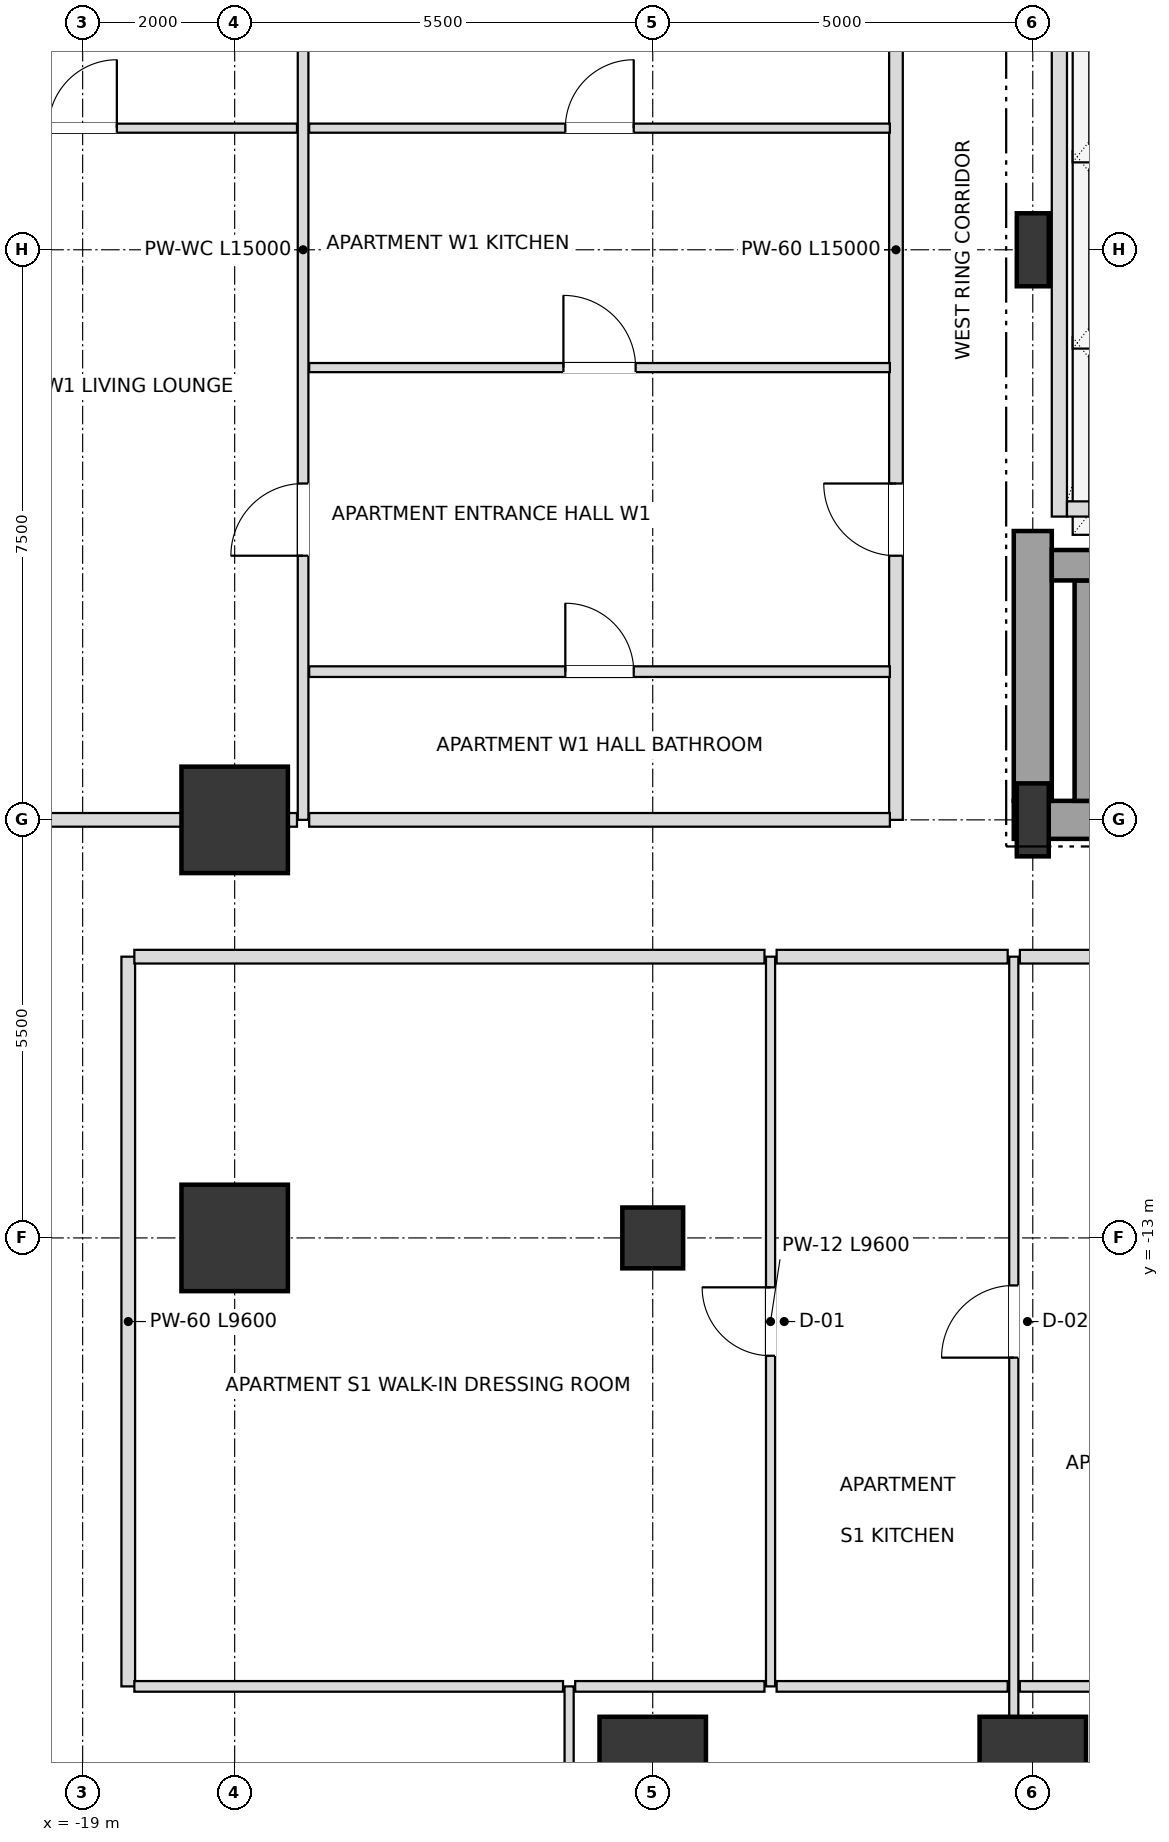
"""IFC4 building model, lengths in metres.
Left out: names, types, materials, properties, quantities, classifications, styles, units other than length and angle.
Written with IfcOpenShell. Run it as: python <this file> out.ifc"""

import sys

from ifc_helpers import new_model, si_unit, direction, frame, frame_2d, origin, origin_2d, place, context, subcontext, project, spatial, rectangle, i_section, extrude, element, fill, save


model = new_model("IFC4")
c1 = context("Model", 3, precision=1e-05, world=origin(), true_north=direction((0.0, 1.0)))
c2 = subcontext(c1, "Body", "Model", "MODEL_VIEW")
j1 = project(units=[si_unit("LENGTHUNIT", "METRE"), si_unit("PLANEANGLEUNIT", "RADIAN")], contexts=[c1])
p1 = place(None, origin())
s1 = spatial("IfcSite", under=j1, at=p1, CompositionType="ELEMENT")
p2 = place(p1, origin())
s2 = spatial("IfcBuilding", under=s1, at=p2, CompositionType="ELEMENT")
p3 = place(p2, frame((0.0, 0.0, 68.4)))
s3 = spatial("IfcBuildingStorey", under=s2, at=p3, CompositionType="ELEMENT", Elevation=68.4)
for number, where, z_axis, x_axis in (
    (1, (-6.5, -7.5, 0.0), (0.0, 0.0, 1.0), (1.0, 0.0, 0.0)),
    (2, (-6.5, 0.0, 0.0), (0.0, 0.0, 1.0), (1.0, 0.0, 0.0)),
):
    element("IfcColumn", number, at=place(p3, frame(where, z_axis=z_axis, x_axis=x_axis)), inside=s3, PredefinedType="COLUMN", context=c2, shape_type="SweptSolid", body=[
        extrude(i_section(OverallWidth=0.42, OverallDepth=0.96, WebThickness=0.022, FlangeThickness=0.034, at=origin_2d()), origin(), (0.0, 0.0, 1.0), 3.6),
    ])
for number, where, z_axis, x_axis in (
    (3, (-11.5, -20.0, 0.0), (0.0, 0.0, 1.0), (1.0, 0.0, 0.0)),
    (4, (-6.5, -20.0, 0.0), (0.0, 0.0, 1.0), (1.0, 0.0, 0.0)),
    (5, (-17.0, -7.5, 0.0), (0.0, 0.0, 1.0), (1.0, 0.0, 0.0)),
    (6, (-17.0, -13.0, 0.0), (0.0, 0.0, 1.0), (1.0, 0.0, 0.0)),
):
    element("IfcColumn", number, at=place(p3, frame(where, z_axis=z_axis, x_axis=x_axis)), inside=s3, PredefinedType="USERDEFINED", context=c2, shape_type="SweptSolid", body=[
        extrude(rectangle(XDim=1.4, YDim=1.4, at=origin_2d()), origin(), (0.0, 0.0, 1.0), 3.6),
    ])
p4 = place(p3, frame((-11.5, -13.0, 0.0), z_axis=(0.0, 0.0, 1.0), x_axis=(1.0, 0.0, 0.0)))
e7 = element("IfcColumn", 7, at=p4, inside=s3, PredefinedType="COLUMN", context=c2, shape_type="SweptSolid", body=[
    extrude(rectangle(XDim=0.8, YDim=0.8, at=origin_2d()), origin(), (0.0, 0.0, 1.0), 3.6),
])
p5 = place(p3, frame((-6.75, -7.5, 0.0), z_axis=(0.0, 0.0, 1.0), x_axis=(1.0, 0.0, 0.0)))
e8 = element("IfcWall", 8, at=p5, inside=s3, PredefinedType="SHEAR", context=c2, shape_type="SweptSolid", body=[
    extrude(rectangle(XDim=6.75, YDim=0.5, at=frame_2d((3.375, 0.0))), origin(), (0.0, 0.0, 1.0), 3.38),
])
p6 = place(p3, frame((-6.5, -7.25, 0.0), z_axis=(0.0, 0.0, 1.0), x_axis=(0.0, 1.0, 0.0)))
e9 = element("IfcWall", 9, at=p6, inside=s3, PredefinedType="SHEAR", context=c2, shape_type="SweptSolid", body=[
    extrude(rectangle(XDim=3.55, YDim=0.5, at=frame_2d((1.775, 0.0))), origin(), (0.0, 0.0, 1.0), 3.38),
])
p7 = place(p3, frame((-5.75, -7.25, 0.0), z_axis=(0.0, 0.0, 1.0), x_axis=(0.0, 1.0, 0.0)))
e10 = element("IfcWall", 10, at=p7, inside=s3, PredefinedType="SHEAR", context=c2, shape_type="SweptSolid", body=[
    extrude(rectangle(XDim=2.9, YDim=0.4, at=frame_2d((1.45, 0.0))), origin(), (0.0, 0.0, 1.0), 3.38),
])
p8 = place(p3, frame((-6.25, -4.15, 0.0), z_axis=(0.0, 0.0, 1.0), x_axis=(1.0, 0.0, 0.0)))
e11 = element("IfcWall", 11, at=p8, inside=s3, PredefinedType="SHEAR", context=c2, shape_type="SweptSolid", body=[
    extrude(rectangle(XDim=7.78, YDim=0.4, at=frame_2d((3.89, 0.0))), origin(), (0.0, 0.0, 1.0), 3.38),
])
p9 = place(p3, frame((-6.15, -3.51, 0.0), z_axis=(0.0, 0.0, 1.0), x_axis=(0.0, 1.0, 0.0)))
e12 = element("IfcWall", 12, at=p9, inside=s3, PredefinedType="SOLIDWALL", context=c2, shape_type="SweptSolid", body=[
    extrude(rectangle(XDim=7.02, YDim=0.2, at=frame_2d((3.51, 0.0))), origin(), (0.0, 0.0, 1.0), 3.38),
])
p10 = place(p3, frame((-6.05, -3.41, 0.0), z_axis=(0.0, 0.0, 1.0), x_axis=(1.0, 0.0, 0.0)))
e13 = element("IfcWall", 13, at=p10, inside=s3, PredefinedType="SOLIDWALL", context=c2, shape_type="SweptSolid", body=[
    extrude(rectangle(XDim=2.2, YDim=0.2, at=frame_2d((1.1, 0.0))), origin(), (0.0, 0.0, 1.0), 3.38),
])
p11 = place(p3, frame((-18.4, -18.9, 0.0), z_axis=(0.0, 0.0, 1.0), x_axis=(0.0, 1.0, 0.0)))
e14 = element("IfcWall", 14, at=p11, inside=s3, PredefinedType="PARTITIONING", context=c2, shape_type="SweptSolid", body=[
    extrude(rectangle(XDim=9.6, YDim=0.18, at=frame_2d((4.8, 0.0))), origin(), (0.0, 0.0, 1.0), 2.736),
])
p12 = place(p3, frame((-16.1, -7.5, 0.0), z_axis=(0.0, 0.0, 1.0), x_axis=(0.0, 1.0, 0.0)))
e15 = element("IfcWall", 15, at=p12, inside=s3, PredefinedType="PARTITIONING", context=c2, shape_type="SweptSolid", body=[
    extrude(rectangle(XDim=15.0, YDim=0.14, at=frame_2d((7.5, 0.0))), origin(), (0.0, 0.0, 1.0), 3.38),
])
p13 = place(p12, frame((3.475, 0.0, 0.0)))
e16 = element("IfcOpeningElement", 16, at=p13, cuts=e15, PredefinedType="OPENING", context=c2, shape_type="SweptSolid", body=[
    extrude(rectangle(XDim=0.95, YDim=2.1, at=frame_2d((0.475, 1.05))), frame((0.0, 0.08, 0.0), z_axis=(0.0, -1.0, 0.0), x_axis=(1.0, 0.0, 0.0)), (0.0, 0.0, 1.0), 0.16),
])
p14 = place(p3, frame((-12.6, -24.9, 0.0), z_axis=(0.0, 0.0, 1.0), x_axis=(0.0, 1.0, 0.0)))
e17 = element("IfcWall", 17, at=p14, inside=s3, PredefinedType="PARTITIONING", context=c2, shape_type="SweptSolid", body=[
    extrude(rectangle(XDim=6.0, YDim=0.12, at=frame_2d((3.0, 0.0))), origin(), (0.0, 0.0, 1.0), 2.736),
])
p15 = place(p14, frame((2.55, 0.0, 0.0)))
e18 = element("IfcOpeningElement", 18, at=p15, cuts=e17, PredefinedType="OPENING", context=c2, shape_type="SweptSolid", body=[
    extrude(rectangle(XDim=0.9, YDim=2.1, at=frame_2d((0.45, 1.05))), frame((0.0, 0.07, 0.0), z_axis=(0.0, -1.0, 0.0), x_axis=(1.0, 0.0, 0.0)), (0.0, 0.0, 1.0), 0.14),
])
p16 = place(p3, frame((-9.95, -18.9, 0.0), z_axis=(0.0, 0.0, 1.0), x_axis=(0.0, 1.0, 0.0)))
e19 = element("IfcWall", 19, at=p16, inside=s3, PredefinedType="PARTITIONING", context=c2, shape_type="SweptSolid", body=[
    extrude(rectangle(XDim=9.6, YDim=0.12, at=frame_2d((4.8, 0.0))), origin(), (0.0, 0.0, 1.0), 2.816),
])
p17 = place(p16, frame((4.35, 0.0, 0.0)))
e20 = element("IfcOpeningElement", 20, at=p17, cuts=e19, PredefinedType="OPENING", context=c2, shape_type="SweptSolid", body=[
    extrude(rectangle(XDim=0.9, YDim=2.1, at=frame_2d((0.45, 1.05))), frame((0.0, 0.07, 0.0), z_axis=(0.0, -1.0, 0.0), x_axis=(1.0, 0.0, 0.0)), (0.0, 0.0, 1.0), 0.14),
])
p18 = place(p3, frame((-8.3, -7.5, 0.0), z_axis=(0.0, 0.0, 1.0), x_axis=(0.0, 1.0, 0.0)))
e21 = element("IfcWall", 21, at=p18, inside=s3, PredefinedType="PARTITIONING", context=c2, shape_type="SweptSolid", body=[
    extrude(rectangle(XDim=15.0, YDim=0.18, at=frame_2d((7.5, 0.0))), origin(), (0.0, 0.0, 1.0), 3.38),
])
p19 = place(p18, frame((3.475, 0.0, 0.0)))
e22 = element("IfcOpeningElement", 22, at=p19, cuts=e21, PredefinedType="OPENING", context=c2, shape_type="SweptSolid", body=[
    extrude(rectangle(XDim=0.95, YDim=2.15, at=frame_2d((0.475, 1.075))), frame((0.0, 0.1, 0.0), z_axis=(0.0, -1.0, 0.0), x_axis=(1.0, 0.0, 0.0)), (0.0, 0.0, 1.0), 0.2),
])
p20 = place(p3, frame((-6.75, -24.9, 0.0), z_axis=(0.0, 0.0, 1.0), x_axis=(0.0, 1.0, 0.0)))
e23 = element("IfcWall", 23, at=p20, inside=s3, PredefinedType="PARTITIONING", context=c2, shape_type="SweptSolid", body=[
    extrude(rectangle(XDim=15.6, YDim=0.12, at=frame_2d((7.8, 0.0))), origin(), (0.0, 0.0, 1.0), 2.816),
])
p21 = place(p20, frame((10.325, 0.0, 0.0)))
e24 = element("IfcOpeningElement", 24, at=p21, cuts=e23, PredefinedType="OPENING", context=c2, shape_type="SweptSolid", body=[
    extrude(rectangle(XDim=0.95, YDim=2.1, at=frame_2d((0.475, 1.05))), frame((0.0, 0.07, 0.0), z_axis=(0.0, -1.0, 0.0), x_axis=(1.0, 0.0, 0.0)), (0.0, 0.0, 1.0), 0.14),
])
p22 = place(p20, frame((2.55, 0.0, 0.0)))
e25 = element("IfcOpeningElement", 25, at=p22, cuts=e23, PredefinedType="OPENING", context=c2, shape_type="SweptSolid", body=[
    extrude(rectangle(XDim=0.9, YDim=2.1, at=frame_2d((0.45, 1.05))), frame((0.0, 0.07, 0.0), z_axis=(0.0, -1.0, 0.0), x_axis=(1.0, 0.0, 0.0)), (0.0, 0.0, 1.0), 0.14),
])
p23 = place(p3, frame((-18.32, -18.9, 0.0), z_axis=(0.0, 0.0, 1.0), x_axis=(1.0, 0.0, 0.0)))
e26 = element("IfcWall", 26, at=p23, inside=s3, PredefinedType="PARTITIONING", context=c2, shape_type="SweptSolid", body=[
    extrude(rectangle(XDim=5.64, YDim=0.14, at=frame_2d((2.82, 0.0))), origin(), (0.0, 0.0, 1.0), 2.736),
])
p24 = place(p3, frame((-12.52, -18.9, 0.0), z_axis=(0.0, 0.0, 1.0), x_axis=(1.0, 0.0, 0.0)))
e27 = element("IfcWall", 27, at=p24, inside=s3, PredefinedType="PARTITIONING", context=c2, shape_type="SweptSolid", body=[
    extrude(rectangle(XDim=2.49, YDim=0.14, at=frame_2d((1.245, 0.0))), origin(), (0.0, 0.0, 1.0), 2.736),
])
p25 = place(p3, frame((-9.87, -18.9, 0.0), z_axis=(0.0, 0.0, 1.0), x_axis=(1.0, 0.0, 0.0)))
e28 = element("IfcWall", 28, at=p25, inside=s3, PredefinedType="PARTITIONING", context=c2, shape_type="SweptSolid", body=[
    extrude(rectangle(XDim=3.04, YDim=0.14, at=frame_2d((1.52, 0.0))), origin(), (0.0, 0.0, 1.0), 3.38),
])
p26 = place(p3, frame((-6.67, -18.9, 0.0), z_axis=(0.0, 0.0, 1.0), x_axis=(1.0, 0.0, 0.0)))
e29 = element("IfcWall", 29, at=p26, inside=s3, PredefinedType="PARTITIONING", context=c2, shape_type="SweptSolid", body=[
    extrude(rectangle(XDim=4.04, YDim=0.14, at=frame_2d((2.02, 0.0))), origin(), (0.0, 0.0, 1.0), 2.816),
])
p27 = place(p26, frame((1.545, 0.0, 0.0)))
e30 = element("IfcOpeningElement", 30, at=p27, cuts=e29, PredefinedType="OPENING", context=c2, shape_type="SweptSolid", body=[
    extrude(rectangle(XDim=0.95, YDim=2.1, at=frame_2d((0.475, 1.05))), frame((0.0, 0.08, 0.0), z_axis=(0.0, -1.0, 0.0), x_axis=(1.0, 0.0, 0.0)), (0.0, 0.0, 1.0), 0.16),
])
p28 = place(p3, frame((-18.32, -9.3, 0.0), z_axis=(0.0, 0.0, 1.0), x_axis=(1.0, 0.0, 0.0)))
e31 = element("IfcWall", 31, at=p28, inside=s3, PredefinedType="PARTITIONING", context=c2, shape_type="SweptSolid", body=[
    extrude(rectangle(XDim=8.29, YDim=0.18, at=frame_2d((4.145, 0.0))), origin(), (0.0, 0.0, 1.0), 2.816),
])
p29 = place(p3, frame((-9.87, -9.3, 0.0), z_axis=(0.0, 0.0, 1.0), x_axis=(1.0, 0.0, 0.0)))
e32 = element("IfcWall", 32, at=p29, inside=s3, PredefinedType="PARTITIONING", context=c2, shape_type="SweptSolid", body=[
    extrude(rectangle(XDim=3.04, YDim=0.18, at=frame_2d((1.52, 0.0))), origin(), (0.0, 0.0, 1.0), 3.38),
])
p30 = place(p3, frame((-6.67, -9.3, 0.0), z_axis=(0.0, 0.0, 1.0), x_axis=(1.0, 0.0, 0.0)))
e33 = element("IfcWall", 33, at=p30, inside=s3, PredefinedType="PARTITIONING", context=c2, shape_type="SweptSolid", body=[
    extrude(rectangle(XDim=4.04, YDim=0.18, at=frame_2d((2.02, 0.0))), origin(), (0.0, 0.0, 1.0), 2.816),
])
p31 = place(p30, frame((1.545, 0.0, 0.0)))
e34 = element("IfcOpeningElement", 34, at=p31, cuts=e33, PredefinedType="OPENING", context=c2, shape_type="SweptSolid", body=[
    extrude(rectangle(XDim=0.95, YDim=2.15, at=frame_2d((0.475, 1.075))), frame((0.0, 0.1, 0.0), z_axis=(0.0, -1.0, 0.0), x_axis=(1.0, 0.0, 0.0)), (0.0, 0.0, 1.0), 0.2),
])
p32 = place(p3, frame((-21.9, -7.5, 0.0), z_axis=(0.0, 0.0, 1.0), x_axis=(1.0, 0.0, 0.0)))
e35 = element("IfcWall", 35, at=p32, inside=s3, PredefinedType="PARTITIONING", context=c2, shape_type="SweptSolid", body=[
    extrude(rectangle(XDim=5.72, YDim=0.18, at=frame_2d((2.86, 0.0))), origin(), (0.0, 0.0, 1.0), 2.816),
])
p33 = place(p3, frame((-16.02, -7.5, 0.0), z_axis=(0.0, 0.0, 1.0), x_axis=(1.0, 0.0, 0.0)))
e36 = element("IfcWall", 36, at=p33, inside=s3, PredefinedType="PARTITIONING", context=c2, shape_type="SweptSolid", body=[
    extrude(rectangle(XDim=7.64, YDim=0.18, at=frame_2d((3.82, 0.0))), origin(), (0.0, 0.0, 1.0), 2.816),
])
p34 = place(p3, frame((-16.02, -5.55, 0.0), z_axis=(0.0, 0.0, 1.0), x_axis=(1.0, 0.0, 0.0)))
e37 = element("IfcWall", 37, at=p34, inside=s3, PredefinedType="PARTITIONING", context=c2, shape_type="SweptSolid", body=[
    extrude(rectangle(XDim=7.64, YDim=0.14, at=frame_2d((3.82, 0.0))), origin(), (0.0, 0.0, 1.0), 2.948),
])
p35 = place(p34, frame((3.37, 0.0, 0.0)))
e38 = element("IfcOpeningElement", 38, at=p35, cuts=e37, PredefinedType="OPENING", context=c2, shape_type="SweptSolid", body=[
    extrude(rectangle(XDim=0.9, YDim=2.1, at=frame_2d((0.45, 1.05))), frame((0.0, 0.08, 0.0), z_axis=(0.0, -1.0, 0.0), x_axis=(1.0, 0.0, 0.0)), (0.0, 0.0, 1.0), 0.16),
])
p36 = place(p3, frame((-16.02, -1.55, 0.0), z_axis=(0.0, 0.0, 1.0), x_axis=(1.0, 0.0, 0.0)))
e39 = element("IfcWall", 39, at=p36, inside=s3, PredefinedType="PARTITIONING", context=c2, shape_type="SweptSolid", body=[
    extrude(rectangle(XDim=7.64, YDim=0.12, at=frame_2d((3.82, 0.0))), origin(), (0.0, 0.0, 1.0), 2.948),
])
p37 = place(p36, frame((3.345, 0.0, 0.0)))
e40 = element("IfcOpeningElement", 40, at=p37, cuts=e39, PredefinedType="OPENING", context=c2, shape_type="SweptSolid", body=[
    extrude(rectangle(XDim=0.95, YDim=2.1, at=frame_2d((0.475, 1.05))), frame((0.0, 0.07, 0.0), z_axis=(0.0, -1.0, 0.0), x_axis=(1.0, 0.0, 0.0)), (0.0, 0.0, 1.0), 0.14),
])
p38 = place(p3, frame((-21.82, 1.6, 0.0), z_axis=(0.0, 0.0, 1.0), x_axis=(1.0, 0.0, 0.0)))
e41 = element("IfcWall", 41, at=p38, inside=s3, PredefinedType="PARTITIONING", context=c2, shape_type="SweptSolid", body=[
    extrude(rectangle(XDim=5.64, YDim=0.12, at=frame_2d((2.82, 0.0))), origin(), (0.0, 0.0, 1.0), 2.816),
])
p39 = place(p38, frame((2.37, 0.0, 0.0)))
e42 = element("IfcOpeningElement", 42, at=p39, cuts=e41, PredefinedType="OPENING", context=c2, shape_type="SweptSolid", body=[
    extrude(rectangle(XDim=0.9, YDim=2.1, at=frame_2d((0.45, 1.05))), frame((0.0, 0.07, 0.0), z_axis=(0.0, -1.0, 0.0), x_axis=(1.0, 0.0, 0.0)), (0.0, 0.0, 1.0), 0.14),
])
p40 = place(p3, frame((-16.02, 1.6, 0.0), z_axis=(0.0, 0.0, 1.0), x_axis=(1.0, 0.0, 0.0)))
e43 = element("IfcWall", 43, at=p40, inside=s3, PredefinedType="PARTITIONING", context=c2, shape_type="SweptSolid", body=[
    extrude(rectangle(XDim=7.64, YDim=0.12, at=frame_2d((3.82, 0.0))), origin(), (0.0, 0.0, 1.0), 2.948),
])
p41 = place(p40, frame((3.37, 0.0, 0.0)))
e44 = element("IfcOpeningElement", 44, at=p41, cuts=e43, PredefinedType="OPENING", context=c2, shape_type="SweptSolid", body=[
    extrude(rectangle(XDim=0.9, YDim=2.1, at=frame_2d((0.45, 1.05))), frame((0.0, 0.07, 0.0), z_axis=(0.0, -1.0, 0.0), x_axis=(1.0, 0.0, 0.0)), (0.0, 0.0, 1.0), 0.14),
])
p42 = place(p21, origin())
e45 = element("IfcDoor", 45, at=p42, inside=s3, OperationType="SINGLE_SWING_LEFT", PredefinedType="DOOR", context=c2, shape_type="SweptSolid", body=[
    extrude(rectangle(XDim=0.95, YDim=2.1, at=frame_2d((0.475, 1.05))), frame((0.0, 0.025, 0.0), z_axis=(0.0, -1.0, 0.0), x_axis=(1.0, 0.0, 0.0)), (0.0, 0.0, 1.0), 0.05),
])
fill(e24, e45)
p43 = place(p17, origin())
e46 = element("IfcDoor", 46, at=p43, inside=s3, OperationType="SINGLE_SWING_RIGHT", PredefinedType="DOOR", context=c2, shape_type="SweptSolid", body=[
    extrude(rectangle(XDim=0.9, YDim=2.1, at=frame_2d((0.45, 1.05))), frame((0.0, 0.025, 0.0), z_axis=(0.0, -1.0, 0.0), x_axis=(1.0, 0.0, 0.0)), (0.0, 0.0, 1.0), 0.05),
])
fill(e20, e46)
p44 = place(p35, origin())
e47 = element("IfcDoor", 47, at=p44, inside=s3, OperationType="SINGLE_SWING_LEFT", PredefinedType="DOOR", context=c2, shape_type="SweptSolid", body=[
    extrude(rectangle(XDim=0.9, YDim=2.1, at=frame_2d((0.45, 1.05))), frame((0.0, 0.025, 0.0), z_axis=(0.0, -1.0, 0.0), x_axis=(1.0, 0.0, 0.0)), (0.0, 0.0, 1.0), 0.05),
])
fill(e38, e47)
p45 = place(p19, origin())
e48 = element("IfcDoor", 48, at=p45, inside=s3, OperationType="SINGLE_SWING_RIGHT", PredefinedType="DOOR", context=c2, shape_type="SweptSolid", body=[
    extrude(rectangle(XDim=0.95, YDim=2.15, at=frame_2d((0.475, 1.075))), frame((0.0, 0.025, 0.0), z_axis=(0.0, -1.0, 0.0), x_axis=(1.0, 0.0, 0.0)), (0.0, 0.0, 1.0), 0.05),
])
fill(e22, e48)
p46 = place(p37, origin())
e49 = element("IfcDoor", 49, at=p46, inside=s3, OperationType="SINGLE_SWING_LEFT", PredefinedType="DOOR", context=c2, shape_type="SweptSolid", body=[
    extrude(rectangle(XDim=0.95, YDim=2.1, at=frame_2d((0.475, 1.05))), frame((0.0, 0.025, 0.0), z_axis=(0.0, -1.0, 0.0), x_axis=(1.0, 0.0, 0.0)), (0.0, 0.0, 1.0), 0.05),
])
fill(e40, e49)
p47 = place(p41, origin())
e50 = element("IfcDoor", 50, at=p47, inside=s3, OperationType="SINGLE_SWING_RIGHT", PredefinedType="DOOR", context=c2, shape_type="SweptSolid", body=[
    extrude(rectangle(XDim=0.9, YDim=2.1, at=frame_2d((0.45, 1.05))), frame((0.0, 0.025, 0.0), z_axis=(0.0, -1.0, 0.0), x_axis=(1.0, 0.0, 0.0)), (0.0, 0.0, 1.0), 0.05),
])
fill(e44, e50)
p48 = place(p13, origin())
e51 = element("IfcDoor", 51, at=p48, inside=s3, OperationType="SINGLE_SWING_LEFT", PredefinedType="DOOR", context=c2, shape_type="SweptSolid", body=[
    extrude(rectangle(XDim=0.95, YDim=2.1, at=frame_2d((0.475, 1.05))), frame((0.0, 0.025, 0.0), z_axis=(0.0, -1.0, 0.0), x_axis=(1.0, 0.0, 0.0)), (0.0, 0.0, 1.0), 0.05),
])
fill(e16, e51)
p49 = place(p39, origin())
e52 = element("IfcDoor", 52, at=p49, inside=s3, OperationType="SINGLE_SWING_RIGHT", PredefinedType="DOOR", context=c2, shape_type="SweptSolid", body=[
    extrude(rectangle(XDim=0.9, YDim=2.1, at=frame_2d((0.45, 1.05))), frame((0.0, 0.025, 0.0), z_axis=(0.0, -1.0, 0.0), x_axis=(1.0, 0.0, 0.0)), (0.0, 0.0, 1.0), 0.05),
])
fill(e42, e52)
save(model, sys.argv[1])
